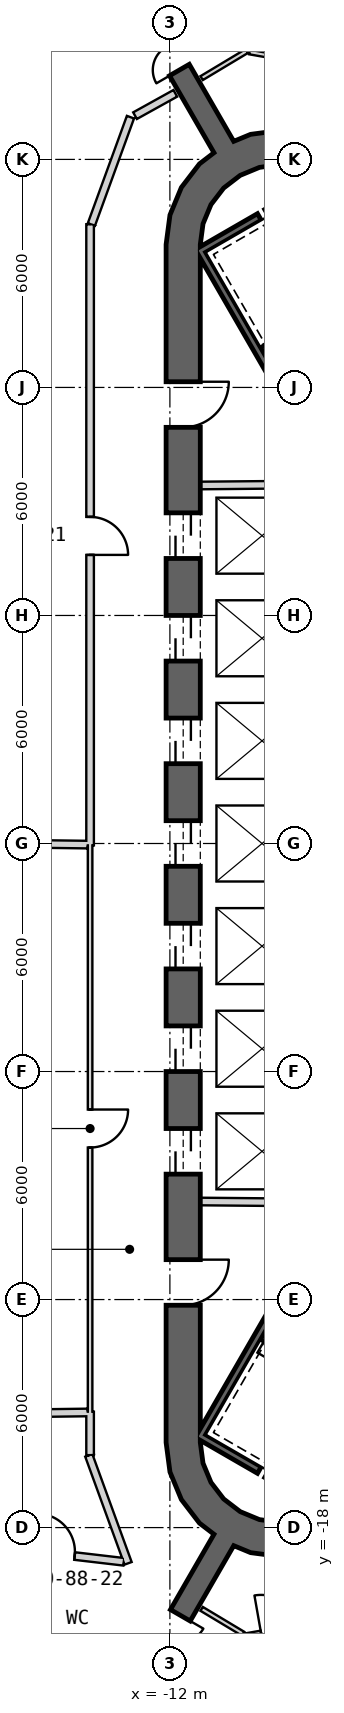
"""IFC4 building model, lengths in metres.
Left out: names, types, materials, properties, quantities, classifications, styles, units other than length and angle.
Written with IfcOpenShell. Run it as: python <this file> out.ifc"""

import sys

from ifc_helpers import new_model, si_unit, direction, frame, frame_2d, origin, place, context, subcontext, project, spatial, polyline, rectangle, outline, extrude, element, fill, save


model = new_model("IFC4")
c1 = context("Model", 3, precision=1e-05, world=origin(), true_north=direction((0.0, 1.0)))
c2 = subcontext(c1, "Body", "Model", "MODEL_VIEW")
j1 = project(units=[si_unit("LENGTHUNIT", "METRE"), si_unit("PLANEANGLEUNIT", "RADIAN")], contexts=[c1])
p1 = place(None, origin())
s1 = spatial("IfcSite", under=j1, at=p1, CompositionType="ELEMENT")
p2 = place(p1, origin())
s2 = spatial("IfcBuilding", under=s1, at=p2, CompositionType="ELEMENT")
p3 = place(p2, frame((0.0, 0.0, 380.6)))
s3 = spatial("IfcBuildingStorey", under=s2, at=p3, CompositionType="ELEMENT", Elevation=380.6)
p4 = place(p3, frame((-11.65, 15.762, 0.0), z_axis=(0.0, 0.0, 1.0), x_axis=(0.0, -1.0, 0.0)))
e1 = element("IfcWall", 1, at=p4, inside=s3, PredefinedType="SHEAR", context=c2, shape_type="SweptSolid", body=[
    extrude(rectangle(XDim=31.523, YDim=0.9, at=frame_2d((15.762, 0.0))), origin(), (0.0, 0.0, 1.0), 3.9),
])
p5 = place(p4, frame((7.062, 0.0, 0.0)))
e2 = element("IfcOpeningElement", 2, at=p5, cuts=e1, PredefinedType="OPENING", context=c2, shape_type="SweptSolid", body=[
    extrude(rectangle(XDim=1.2, YDim=2.4, at=frame_2d((0.6, 1.2))), frame((0.0, 0.46, 0.0), z_axis=(0.0, -1.0, 0.0), x_axis=(1.0, 0.0, 0.0)), (0.0, 0.0, 1.0), 0.92),
])
p6 = place(p4, frame((9.762, 0.0, 0.0)))
e3 = element("IfcOpeningElement", 3, at=p6, cuts=e1, PredefinedType="OPENING", context=c2, shape_type="SweptSolid", body=[
    extrude(rectangle(XDim=1.2, YDim=2.4, at=frame_2d((0.6, 1.2))), frame((0.0, 0.46, 0.0), z_axis=(0.0, -1.0, 0.0), x_axis=(1.0, 0.0, 0.0)), (0.0, 0.0, 1.0), 0.92),
])
p7 = place(p4, frame((12.462, 0.0, 0.0)))
e4 = element("IfcOpeningElement", 4, at=p7, cuts=e1, PredefinedType="OPENING", context=c2, shape_type="SweptSolid", body=[
    extrude(rectangle(XDim=1.2, YDim=2.4, at=frame_2d((0.6, 1.2))), frame((0.0, 0.46, 0.0), z_axis=(0.0, -1.0, 0.0), x_axis=(1.0, 0.0, 0.0)), (0.0, 0.0, 1.0), 0.92),
])
p8 = place(p4, frame((15.162, 0.0, 0.0)))
e5 = element("IfcOpeningElement", 5, at=p8, cuts=e1, PredefinedType="OPENING", context=c2, shape_type="SweptSolid", body=[
    extrude(rectangle(XDim=1.2, YDim=2.4, at=frame_2d((0.6, 1.2))), frame((0.0, 0.46, 0.0), z_axis=(0.0, -1.0, 0.0), x_axis=(1.0, 0.0, 0.0)), (0.0, 0.0, 1.0), 0.92),
])
p9 = place(p4, frame((17.862, 0.0, 0.0)))
e6 = element("IfcOpeningElement", 6, at=p9, cuts=e1, PredefinedType="OPENING", context=c2, shape_type="SweptSolid", body=[
    extrude(rectangle(XDim=1.2, YDim=2.4, at=frame_2d((0.6, 1.2))), frame((0.0, 0.46, 0.0), z_axis=(0.0, -1.0, 0.0), x_axis=(1.0, 0.0, 0.0)), (0.0, 0.0, 1.0), 0.92),
])
p10 = place(p4, frame((20.562, 0.0, 0.0)))
e7 = element("IfcOpeningElement", 7, at=p10, cuts=e1, PredefinedType="OPENING", context=c2, shape_type="SweptSolid", body=[
    extrude(rectangle(XDim=1.2, YDim=2.4, at=frame_2d((0.6, 1.2))), frame((0.0, 0.46, 0.0), z_axis=(0.0, -1.0, 0.0), x_axis=(1.0, 0.0, 0.0)), (0.0, 0.0, 1.0), 0.92),
])
p11 = place(p4, frame((23.262, 0.0, 0.0)))
e8 = element("IfcOpeningElement", 8, at=p11, cuts=e1, PredefinedType="OPENING", context=c2, shape_type="SweptSolid", body=[
    extrude(rectangle(XDim=1.2, YDim=2.4, at=frame_2d((0.6, 1.2))), frame((0.0, 0.46, 0.0), z_axis=(0.0, -1.0, 0.0), x_axis=(1.0, 0.0, 0.0)), (0.0, 0.0, 1.0), 0.92),
])
p12 = place(p4, frame((3.612, 0.0, 0.0)))
e9 = element("IfcOpeningElement", 9, at=p12, cuts=e1, PredefinedType="OPENING", context=c2, shape_type="SweptSolid", body=[
    extrude(rectangle(XDim=1.2, YDim=2.4, at=frame_2d((0.6, 1.2))), frame((0.0, 0.46, 0.0), z_axis=(0.0, -1.0, 0.0), x_axis=(1.0, 0.0, 0.0)), (0.0, 0.0, 1.0), 0.92),
])
p13 = place(p4, frame((26.712, 0.0, 0.0)))
e10 = element("IfcOpeningElement", 10, at=p13, cuts=e1, PredefinedType="OPENING", context=c2, shape_type="SweptSolid", body=[
    extrude(rectangle(XDim=1.2, YDim=2.4, at=frame_2d((0.6, 1.2))), frame((0.0, 0.46, 0.0), z_axis=(0.0, -1.0, 0.0), x_axis=(1.0, 0.0, 0.0)), (0.0, 0.0, 1.0), 0.92),
])
p14 = place(p3, origin())
e11 = element("IfcWall", 11, at=p14, inside=s3, PredefinedType="SHEAR", context=c2, shape_type="SweptSolid", body=[
    extrude(outline(polyline([(-7.6, 18.36), (-8.323, 18.659), (-9.1, 18.762), (-9.876, 18.659), (-10.6, 18.36), (-11.221, 17.883), (-11.698, 17.262), (-11.998, 16.538), (-12.1, 15.762), (-11.2, 15.762), (-11.128, 16.305), (-10.919, 16.812), (-10.585, 17.247), (-10.15, 17.58), (-9.644, 17.79), (-9.1, 17.862), (-8.556, 17.79), (-8.05, 17.58), (-7.6, 18.36)])), origin(), (0.0, 0.0, 1.0), 3.9),
])
p15 = place(p3, origin())
e12 = element("IfcWall", 12, at=p15, inside=s3, PredefinedType="SHEAR", context=c2, shape_type="SweptSolid", body=[
    extrude(outline(polyline([(-12.1, -15.762), (-11.998, -16.538), (-11.698, -17.262), (-11.221, -17.883), (-10.6, -18.36), (-9.876, -18.659), (-9.1, -18.762), (-8.323, -18.659), (-7.6, -18.36), (-8.05, -17.58), (-8.556, -17.79), (-9.1, -17.862), (-9.644, -17.79), (-10.15, -17.58), (-10.585, -17.247), (-10.919, -16.812), (-11.128, -16.305), (-11.2, -15.762), (-12.1, -15.762)])), origin(), (0.0, 0.0, 1.0), 3.9),
])
p16 = place(p3, frame((-10.575, 18.316, 0.0), z_axis=(0.0, 0.0, 1.0), x_axis=(-0.500011655475, 0.866018674388, 0.0)))
e13 = element("IfcWall", 13, at=p16, inside=s3, PredefinedType="SHEAR", context=c2, shape_type="SweptSolid", body=[
    extrude(rectangle(XDim=6.455, YDim=0.6, at=frame_2d((3.228, 0.0))), origin(), (0.0, 0.0, 1.0), 3.9),
])
p17 = place(p16, frame((2.05, 0.0, 0.0)))
e14 = element("IfcOpeningElement", 14, at=p17, cuts=e13, PredefinedType="OPENING", context=c2, shape_type="SweptSolid", body=[
    extrude(rectangle(XDim=1.4, YDim=2.4, at=frame_2d((0.7, 1.2))), frame((0.0, 0.31, 0.0), z_axis=(0.0, -1.0, 0.0), x_axis=(1.0, 0.0, 0.0)), (0.0, 0.0, 1.0), 0.62),
])
p18 = place(p3, frame((-10.575, -18.316, 0.0), z_axis=(0.0, 0.0, 1.0), x_axis=(-0.500011655475, -0.866018674388, 0.0)))
e15 = element("IfcWall", 15, at=p18, inside=s3, PredefinedType="SHEAR", context=c2, shape_type="SweptSolid", body=[
    extrude(rectangle(XDim=6.455, YDim=0.6, at=frame_2d((3.228, 0.0))), origin(), (0.0, 0.0, 1.0), 3.9),
])
p19 = place(p18, frame((2.35, 0.0, 0.0)))
e16 = element("IfcOpeningElement", 16, at=p19, cuts=e15, PredefinedType="OPENING", context=c2, shape_type="SweptSolid", body=[
    extrude(rectangle(XDim=1.4, YDim=2.4, at=frame_2d((0.7, 1.2))), frame((0.0, 0.31, 0.0), z_axis=(0.0, -1.0, 0.0), x_axis=(1.0, 0.0, 0.0)), (0.0, 0.0, 1.0), 0.62),
])
p20 = place(p3, frame((-11.2, 9.42, 0.0), z_axis=(0.0, 0.0, 1.0), x_axis=(0.999957167047, 0.009255488683, 0.0)))
e17 = element("IfcWall", 17, at=p20, inside=s3, PredefinedType="PLUMBINGWALL", context=c2, shape_type="SweptSolid", body=[
    extrude(rectangle(XDim=3.35, YDim=0.2, at=frame_2d((1.675, 0.0))), origin(), (0.0, 0.0, 1.0), 3.6),
])
p21 = place(p3, frame((-8.05, -9.449, 0.0), z_axis=(0.0, 0.0, 1.0), x_axis=(-0.999957467379, 0.009222983926, 0.0)))
e18 = element("IfcWall", 18, at=p21, inside=s3, PredefinedType="PLUMBINGWALL", context=c2, shape_type="SweptSolid", body=[
    extrude(rectangle(XDim=3.15, YDim=0.2, at=frame_2d((1.575, 0.0))), origin(), (0.0, 0.0, 1.0), 3.6),
])
p22 = place(p3, frame((-11.245, 15.678, -0.3), z_axis=(0.0, 0.0, 1.0), x_axis=(0.499977274689, -0.866038523851, 0.0)))
e19 = element("IfcWall", 19, at=p22, inside=s3, PredefinedType="SHEAR", context=c2, shape_type="SweptSolid", body=[
    extrude(rectangle(XDim=8.1, YDim=0.2, at=frame_2d((4.05, 0.0))), origin(), (0.0, 0.0, 1.0), 3.9),
])
p23 = place(p3, frame((-9.645, 16.486, -0.3), z_axis=(0.0, 0.0, 1.0), x_axis=(-0.866038843867, -0.499976720371, 0.0)))
e20 = element("IfcWall", 20, at=p23, inside=s3, PredefinedType="SHEAR", context=c2, shape_type="SweptSolid", body=[
    extrude(rectangle(XDim=1.69, YDim=0.2, at=frame_2d((0.845, 0.0))), origin(), (0.0, 0.0, 1.0), 3.9),
])
p24 = place(p3, frame((-11.282, -15.541, -0.3), z_axis=(0.0, 0.0, 1.0), x_axis=(0.866000578957, -0.500042995397, 0.0)))
e21 = element("IfcWall", 21, at=p24, inside=s3, PredefinedType="SHEAR", context=c2, shape_type="SweptSolid", body=[
    extrude(rectangle(XDim=1.89, YDim=0.2, at=frame_2d((0.945, 0.0))), origin(), (0.0, 0.0, 1.0), 3.9),
])
p25 = place(p3, frame((-7.196, -8.663, -0.3), z_axis=(0.0, 0.0, 1.0), x_axis=(-0.499997992926, -0.866026562566, 0.0)))
e22 = element("IfcWall", 22, at=p25, inside=s3, PredefinedType="SHEAR", context=c2, shape_type="SweptSolid", body=[
    extrude(rectangle(XDim=7.9, YDim=0.2, at=frame_2d((3.95, 0.0))), origin(), (0.0, 0.0, 1.0), 3.9),
])
p26 = place(p3, frame((-14.1, 16.294, 0.0), z_axis=(0.0, 0.0, 1.0), x_axis=(0.0, -1.0, 0.0)))
e23 = element("IfcWall", 23, at=p26, inside=s3, PredefinedType="PARTITIONING", context=c2, shape_type="SweptSolid", body=[
    extrude(rectangle(XDim=8.925, YDim=0.2, at=frame_2d((4.462, 0.0))), origin(), (0.0, 0.0, 1.0), 2.97),
])
p27 = place(p26, frame((4.1, 0.0, 0.0)))
e24 = element("IfcOpeningElement", 24, at=p27, cuts=e23, PredefinedType="OPENING", context=c2, shape_type="SweptSolid", body=[
    extrude(rectangle(XDim=1.0, YDim=2.1, at=frame_2d((0.5, 1.05))), frame((0.0, 0.11, 0.0), z_axis=(0.0, -1.0, 0.0), x_axis=(1.0, 0.0, 0.0)), (0.0, 0.0, 1.0), 0.22),
])
p28 = place(p3, frame((-14.1, 7.369, 0.0), z_axis=(0.0, 0.0, 1.0), x_axis=(0.0, -1.0, 0.0)))
e25 = element("IfcWall", 25, at=p28, inside=s3, PredefinedType="PARTITIONING", context=c2, shape_type="SweptSolid", body=[
    extrude(rectangle(XDim=13.701, YDim=0.2, at=frame_2d((6.851, 0.0))), origin(), (0.0, 0.0, 1.0), 3.07),
])
p29 = place(p28, frame((6.456, 0.0, 0.0)))
e26 = element("IfcOpeningElement", 26, at=p29, cuts=e25, PredefinedType="OPENING", context=c2, shape_type="SweptSolid", body=[
    extrude(rectangle(XDim=1.0, YDim=2.1, at=frame_2d((0.5, 1.05))), frame((0.0, 0.11, 0.0), z_axis=(0.0, -1.0, 0.0), x_axis=(1.0, 0.0, 0.0)), (0.0, 0.0, 1.0), 0.22),
])
p30 = place(p3, frame((-13.038, 19.112, 0.0), z_axis=(0.0, 0.0, 1.0), x_axis=(-0.342062629946, -0.939677155833, 0.0)))
e27 = element("IfcWall", 27, at=p30, inside=s3, PredefinedType="PARTITIONING", context=c2, shape_type="SweptSolid", body=[
    extrude(rectangle(XDim=3.006, YDim=0.2, at=frame_2d((1.503, 0.0))), origin(), (0.0, 0.0, 1.0), 2.97),
])
p31 = place(p3, frame((-11.858, 19.739, 0.0), z_axis=(0.0, 0.0, 1.0), x_axis=(-0.874375812865, -0.48524935639, 0.0)))
e28 = element("IfcWall", 28, at=p31, inside=s3, PredefinedType="PARTITIONING", context=c2, shape_type="SweptSolid", body=[
    extrude(rectangle(XDim=1.211, YDim=0.2, at=frame_2d((0.606, 0.0))), origin(), (0.0, 0.0, 1.0), 3.6),
])
p32 = place(p3, frame((-13.051, -19.077, 0.0), z_axis=(0.0, 0.0, 1.0), x_axis=(0.87441884207, -0.485171813519, 0.0)))
e29 = element("IfcWall", 29, at=p32, inside=s3, PredefinedType="PARTITIONING", context=c2, shape_type="SweptSolid", body=[
    extrude(rectangle(XDim=1.364, YDim=0.2, at=frame_2d((0.682, 0.0))), origin(), (0.0, 0.0, 1.0), 3.6),
])
p33 = place(p3, frame((-14.1, -6.373, 0.0), z_axis=(0.0, 0.0, 1.0), x_axis=(0.0, -1.0, 0.0)))
e30 = element("IfcWall", 30, at=p33, inside=s3, PredefinedType="PARTITIONING", context=c2, shape_type="SweptSolid", body=[
    extrude(rectangle(XDim=6.662, YDim=0.12, at=frame_2d((3.331, 0.0))), origin(), (0.0, 0.0, 1.0), 2.97),
])
p34 = place(p33, frame((2.932, 0.0, 0.0)))
e31 = element("IfcOpeningElement", 31, at=p34, cuts=e30, PredefinedType="OPENING", context=c2, shape_type="SweptSolid", body=[
    extrude(rectangle(XDim=0.9, YDim=2.1, at=frame_2d((0.45, 1.05))), frame((0.0, 0.07, 0.0), z_axis=(0.0, -1.0, 0.0), x_axis=(1.0, 0.0, 0.0)), (0.0, 0.0, 1.0), 0.14),
])
p35 = place(p3, frame((-14.1, -13.035, 0.0), z_axis=(0.0, 0.0, 1.0), x_axis=(0.0, -1.0, 0.0)))
e32 = element("IfcWall", 32, at=p35, inside=s3, PredefinedType="PARTITIONING", context=c2, shape_type="SweptSolid", body=[
    extrude(rectangle(XDim=3.099, YDim=0.12, at=frame_2d((1.549, 0.0))), origin(), (0.0, 0.0, 1.0), 3.6),
])
p36 = place(p35, frame((1.249, 0.0, 0.0)))
e33 = element("IfcOpeningElement", 33, at=p36, cuts=e32, PredefinedType="OPENING", context=c2, shape_type="SweptSolid", body=[
    extrude(rectangle(XDim=0.9, YDim=2.1, at=frame_2d((0.45, 1.05))), frame((0.0, 0.07, 0.0), z_axis=(0.0, -1.0, 0.0), x_axis=(1.0, 0.0, 0.0)), (0.0, 0.0, 1.0), 0.14),
])
p37 = place(p3, frame((-14.121, -16.137, 0.0), z_axis=(0.0, 0.0, 1.0), x_axis=(0.342063022862, -0.939677012803, 0.0)))
e34 = element("IfcWall", 34, at=p37, inside=s3, PredefinedType="PARTITIONING", context=c2, shape_type="SweptSolid", body=[
    extrude(rectangle(XDim=2.941, YDim=0.12, at=frame_2d((1.47, 0.0))), origin(), (0.0, 0.0, 1.0), 2.97),
])
p38 = place(p3, frame((-14.2, 7.337, 0.0), z_axis=(0.0, 0.0, 1.0), x_axis=(-0.996967879897, -0.077814179003, 0.0)))
e35 = element("IfcWall", 35, at=p38, inside=s3, PredefinedType="PARTITIONING", context=c2, shape_type="SweptSolid", body=[
    extrude(rectangle(XDim=6.965, YDim=0.2, at=frame_2d((3.483, 0.0))), origin(), (0.0, 0.0, 1.0), 3.07),
])
p39 = place(p3, frame((-14.2, -6.281, 0.0), z_axis=(0.0, 0.0, 1.0), x_axis=(-0.996288464518, -0.086077264523, 0.0)))
e36 = element("IfcWall", 36, at=p39, inside=s3, PredefinedType="PARTITIONING", context=c2, shape_type="SweptSolid", body=[
    extrude(rectangle(XDim=3.605, YDim=0.2, at=frame_2d((1.802, 0.0))), origin(), (0.0, 0.0, 1.0), 3.6),
])
p40 = place(p3, frame((-16.448, -19.975, 0.0), z_axis=(0.0, 0.0, 1.0), x_axis=(0.960187968548, 0.279354729788, 0.0)))
e37 = element("IfcWall", 37, at=p40, inside=s3, PredefinedType="PARTITIONING", context=c2, shape_type="SweptSolid", body=[
    extrude(rectangle(XDim=3.574, YDim=0.2, at=frame_2d((1.787, 0.0))), origin(), (0.0, 0.0, 1.0), 2.97),
])
p41 = place(p3, frame((-17.6, -14.093, 0.0), z_axis=(0.0, 0.0, 1.0), x_axis=(0.957925393659, 0.287017316871, 0.0)))
e38 = element("IfcWall", 38, at=p41, inside=s3, PredefinedType="PARTITIONING", context=c2, shape_type="SweptSolid", body=[
    extrude(rectangle(XDim=3.591, YDim=0.12, at=frame_2d((1.796, 0.0))), origin(), (0.0, 0.0, 1.0), 2.97),
])
p42 = place(p3, frame((-6.915, 20.297, 0.0), z_axis=(0.0, 0.0, 1.0), x_axis=(-0.984804149706, 0.173668611791, 0.0)))
e39 = element("IfcWall", 39, at=p42, inside=s3, PredefinedType="PARTITIONING", context=c2, shape_type="SweptSolid", body=[
    extrude(rectangle(XDim=2.983, YDim=0.12, at=frame_2d((1.492, 0.0))), origin(), (0.0, 0.0, 1.0), 2.97),
])
p43 = place(p3, frame((-10.032, -20.847, 0.0), z_axis=(0.0, 0.0, 1.0), x_axis=(0.984816253597, 0.173599961555, 0.0)))
e40 = element("IfcWall", 40, at=p43, inside=s3, PredefinedType="PARTITIONING", context=c2, shape_type="SweptSolid", body=[
    extrude(rectangle(XDim=3.005, YDim=0.2, at=frame_2d((1.503, 0.0))), origin(), (0.0, 0.0, 1.0), 2.97),
])
p44 = place(p3, frame((-11.165, -20.138, 0.0), z_axis=(0.0, 0.0, 1.0), x_axis=(0.857404013622, -0.51464391323, 0.0)))
e41 = element("IfcWall", 41, at=p44, inside=s3, PredefinedType="PARTITIONING", context=c2, shape_type="SweptSolid", body=[
    extrude(rectangle(XDim=1.212, YDim=0.2, at=frame_2d((0.606, 0.0))), origin(), (0.0, 0.0, 1.0), 3.6),
])
p45 = place(p27, origin())
e42 = element("IfcDoor", 42, at=p45, inside=s3, OperationType="SINGLE_SWING_RIGHT", PredefinedType="USERDEFINED", context=c2, shape_type="SweptSolid", body=[
    extrude(rectangle(XDim=1.0, YDim=2.1, at=frame_2d((0.5, 1.05))), frame((0.0, 0.025, 0.0), z_axis=(0.0, -1.0, 0.0), x_axis=(1.0, 0.0, 0.0)), (0.0, 0.0, 1.0), 0.05),
])
fill(e24, e42)
p46 = place(p29, origin())
e43 = element("IfcDoor", 43, at=p46, inside=s3, OperationType="SINGLE_SWING_LEFT", PredefinedType="USERDEFINED", context=c2, shape_type="SweptSolid", body=[
    extrude(rectangle(XDim=1.0, YDim=2.1, at=frame_2d((0.5, 1.05))), frame((0.0, 0.025, 0.0), z_axis=(0.0, -1.0, 0.0), x_axis=(1.0, 0.0, 0.0)), (0.0, 0.0, 1.0), 0.05),
])
fill(e26, e43)
p47 = place(p34, origin())
e44 = element("IfcDoor", 44, at=p47, inside=s3, OperationType="SINGLE_SWING_RIGHT", PredefinedType="NOTDEFINED", context=c2, shape_type="SweptSolid", body=[
    extrude(rectangle(XDim=0.9, YDim=2.1, at=frame_2d((0.45, 1.05))), frame((0.0, 0.025, 0.0), z_axis=(0.0, -1.0, 0.0), x_axis=(1.0, 0.0, 0.0)), (0.0, 0.0, 1.0), 0.05),
])
fill(e31, e44)
p48 = place(p36, origin())
e45 = element("IfcDoor", 45, at=p48, inside=s3, OperationType="SINGLE_SWING_LEFT", PredefinedType="NOTDEFINED", context=c2, shape_type="SweptSolid", body=[
    extrude(rectangle(XDim=0.9, YDim=2.1, at=frame_2d((0.45, 1.05))), frame((0.0, 0.025, 0.0), z_axis=(0.0, -1.0, 0.0), x_axis=(1.0, 0.0, 0.0)), (0.0, 0.0, 1.0), 0.05),
])
fill(e33, e45)
p49 = place(p5, origin())
e46 = element("IfcDoor", 46, at=p49, inside=s3, OperationType="SLIDING_TO_LEFT", PredefinedType="USERDEFINED", context=c2, shape_type="SweptSolid", body=[
    extrude(rectangle(XDim=1.2, YDim=2.4, at=frame_2d((0.6, 1.2))), frame((0.0, 0.025, 0.0), z_axis=(0.0, -1.0, 0.0), x_axis=(1.0, 0.0, 0.0)), (0.0, 0.0, 1.0), 0.05),
])
fill(e2, e46)
p50 = place(p6, origin())
e47 = element("IfcDoor", 47, at=p50, inside=s3, OperationType="SLIDING_TO_LEFT", PredefinedType="USERDEFINED", context=c2, shape_type="SweptSolid", body=[
    extrude(rectangle(XDim=1.2, YDim=2.4, at=frame_2d((0.6, 1.2))), frame((0.0, 0.025, 0.0), z_axis=(0.0, -1.0, 0.0), x_axis=(1.0, 0.0, 0.0)), (0.0, 0.0, 1.0), 0.05),
])
fill(e3, e47)
p51 = place(p7, origin())
e48 = element("IfcDoor", 48, at=p51, inside=s3, OperationType="SLIDING_TO_LEFT", PredefinedType="USERDEFINED", context=c2, shape_type="SweptSolid", body=[
    extrude(rectangle(XDim=1.2, YDim=2.4, at=frame_2d((0.6, 1.2))), frame((0.0, 0.025, 0.0), z_axis=(0.0, -1.0, 0.0), x_axis=(1.0, 0.0, 0.0)), (0.0, 0.0, 1.0), 0.05),
])
fill(e4, e48)
p52 = place(p8, origin())
e49 = element("IfcDoor", 49, at=p52, inside=s3, OperationType="SLIDING_TO_LEFT", PredefinedType="USERDEFINED", context=c2, shape_type="SweptSolid", body=[
    extrude(rectangle(XDim=1.2, YDim=2.4, at=frame_2d((0.6, 1.2))), frame((0.0, 0.025, 0.0), z_axis=(0.0, -1.0, 0.0), x_axis=(1.0, 0.0, 0.0)), (0.0, 0.0, 1.0), 0.05),
])
fill(e5, e49)
p53 = place(p9, origin())
e50 = element("IfcDoor", 50, at=p53, inside=s3, OperationType="SLIDING_TO_LEFT", PredefinedType="USERDEFINED", context=c2, shape_type="SweptSolid", body=[
    extrude(rectangle(XDim=1.2, YDim=2.4, at=frame_2d((0.6, 1.2))), frame((0.0, 0.025, 0.0), z_axis=(0.0, -1.0, 0.0), x_axis=(1.0, 0.0, 0.0)), (0.0, 0.0, 1.0), 0.05),
])
fill(e6, e50)
p54 = place(p10, origin())
e51 = element("IfcDoor", 51, at=p54, inside=s3, OperationType="SLIDING_TO_LEFT", PredefinedType="USERDEFINED", context=c2, shape_type="SweptSolid", body=[
    extrude(rectangle(XDim=1.2, YDim=2.4, at=frame_2d((0.6, 1.2))), frame((0.0, 0.025, 0.0), z_axis=(0.0, -1.0, 0.0), x_axis=(1.0, 0.0, 0.0)), (0.0, 0.0, 1.0), 0.05),
])
fill(e7, e51)
p55 = place(p11, origin())
e52 = element("IfcDoor", 52, at=p55, inside=s3, OperationType="SLIDING_TO_LEFT", PredefinedType="USERDEFINED", context=c2, shape_type="SweptSolid", body=[
    extrude(rectangle(XDim=1.2, YDim=2.4, at=frame_2d((0.6, 1.2))), frame((0.0, 0.025, 0.0), z_axis=(0.0, -1.0, 0.0), x_axis=(1.0, 0.0, 0.0)), (0.0, 0.0, 1.0), 0.05),
])
fill(e8, e52)
p56 = place(p12, origin())
e53 = element("IfcDoor", 53, at=p56, inside=s3, OperationType="SINGLE_SWING_RIGHT", PredefinedType="USERDEFINED", context=c2, shape_type="SweptSolid", body=[
    extrude(rectangle(XDim=1.2, YDim=2.4, at=frame_2d((0.6, 1.2))), frame((0.0, 0.025, 0.0), z_axis=(0.0, -1.0, 0.0), x_axis=(1.0, 0.0, 0.0)), (0.0, 0.0, 1.0), 0.05),
])
fill(e9, e53)
p57 = place(p13, origin())
e54 = element("IfcDoor", 54, at=p57, inside=s3, OperationType="SINGLE_SWING_LEFT", PredefinedType="USERDEFINED", context=c2, shape_type="SweptSolid", body=[
    extrude(rectangle(XDim=1.2, YDim=2.4, at=frame_2d((0.6, 1.2))), frame((0.0, 0.025, 0.0), z_axis=(0.0, -1.0, 0.0), x_axis=(1.0, 0.0, 0.0)), (0.0, 0.0, 1.0), 0.05),
])
fill(e10, e54)
p58 = place(p17, origin())
e55 = element("IfcDoor", 55, at=p58, inside=s3, OperationType="DOUBLE_DOOR_SINGLE_SWING", PredefinedType="NOTDEFINED", context=c2, shape_type="SweptSolid", body=[
    extrude(rectangle(XDim=1.4, YDim=2.4, at=frame_2d((0.7, 1.2))), frame((0.0, 0.025, 0.0), z_axis=(0.0, -1.0, 0.0), x_axis=(1.0, 0.0, 0.0)), (0.0, 0.0, 1.0), 0.05),
])
fill(e14, e55)
p59 = place(p19, origin())
e56 = element("IfcDoor", 56, at=p59, inside=s3, OperationType="DOUBLE_DOOR_SINGLE_SWING", PredefinedType="NOTDEFINED", context=c2, shape_type="SweptSolid", body=[
    extrude(rectangle(XDim=1.4, YDim=2.4, at=frame_2d((0.7, 1.2))), frame((0.0, 0.025, 0.0), z_axis=(0.0, -1.0, 0.0), x_axis=(1.0, 0.0, 0.0)), (0.0, 0.0, 1.0), 0.05),
])
fill(e16, e56)
save(model, sys.argv[1])
